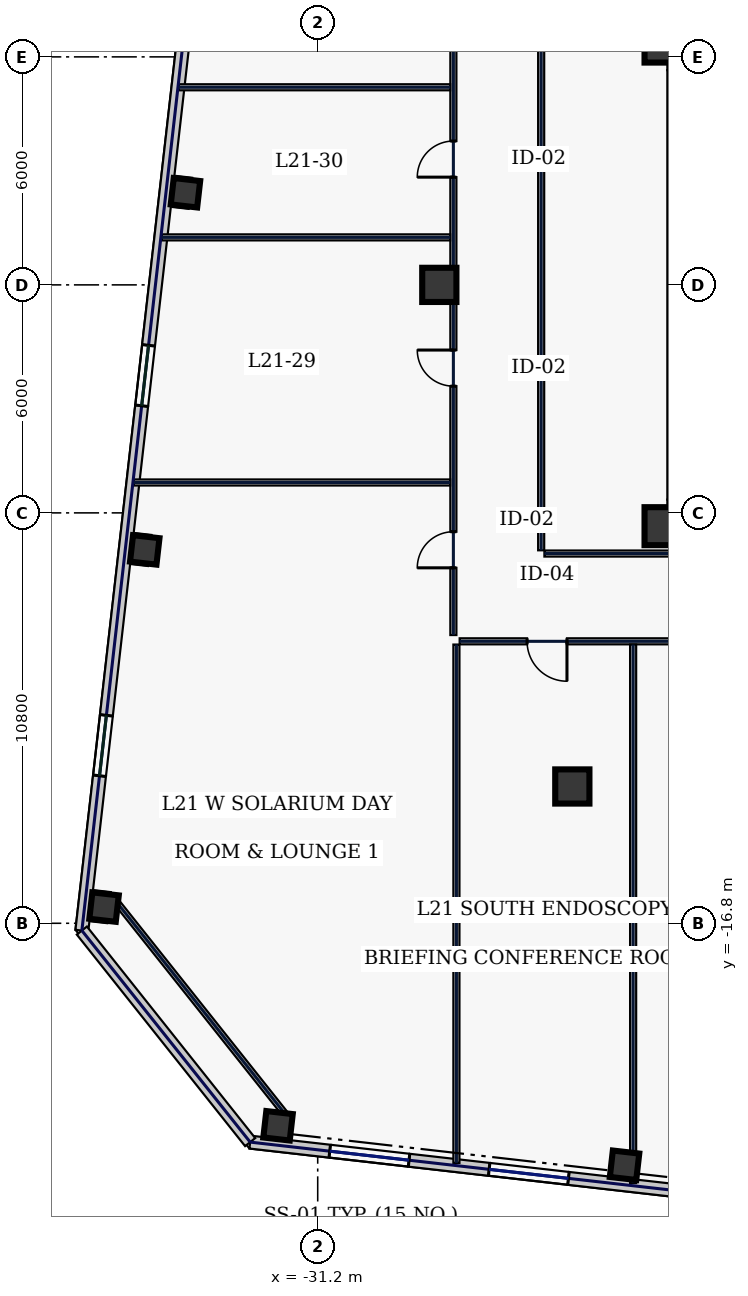
"""IFC4 building model, lengths in metres.
Left out: names, types, materials, properties, quantities, classifications, styles, units other than length and angle.
Written with IfcOpenShell. Run it as: python <this file> out.ifc"""

import sys

from ifc_helpers import new_model, si_unit, direction, frame, frame_2d, origin, origin_2d, place, context, subcontext, project, spatial, rectangle, hollow_rectangle, extrude, element, fill, save


model = new_model("IFC4")
c1 = context("Model", 3, precision=1e-05, world=origin(), true_north=direction((0.0, 1.0)))
c2 = subcontext(c1, "Body", "Model", "MODEL_VIEW")
j1 = project(units=[si_unit("LENGTHUNIT", "METRE"), si_unit("PLANEANGLEUNIT", "RADIAN")], contexts=[c1])
p1 = place(None, origin())
s1 = spatial("IfcSite", under=j1, at=p1, CompositionType="ELEMENT")
p2 = place(p1, origin())
s2 = spatial("IfcBuilding", under=s1, at=p2, CompositionType="ELEMENT")
p3 = place(p2, frame((0.0, 0.0, 97.4)))
s3 = spatial("IfcBuildingStorey", under=s2, at=p3, CompositionType="ELEMENT", Elevation=97.4)
for number, where, z_axis, x_axis in (
    (1, (-22.0, 6.0, 0.0), (0.0, 0.0, 1.0), (1.0, 0.0, 0.0)),
    (2, (-22.0, -6.0, 0.0), (0.0, 0.0, 1.0), (1.0, 0.0, 0.0)),
):
    element("IfcWall", number, at=place(p3, frame(where, z_axis=z_axis, x_axis=x_axis)), inside=s3, PredefinedType="SHEAR", context=c2, shape_type="SweptSolid", body=[
        extrude(rectangle(XDim=11.55, YDim=0.7, at=frame_2d((5.775, 0.0))), origin(), (0.0, 0.0, 1.0), 3.74),
    ])
p4 = place(p3, frame((-21.6, -5.65, 0.0), z_axis=(0.0, 0.0, 1.0), x_axis=(0.0, 1.0, 0.0)))
e3 = element("IfcWall", 3, at=p4, inside=s3, PredefinedType="SHEAR", context=c2, shape_type="SweptSolid", body=[
    extrude(rectangle(XDim=11.3, YDim=0.8, at=frame_2d((5.65, 0.0))), origin(), (0.0, 0.0, 1.0), 3.74),
])
for number, where, z_axis, x_axis in (
    (4, (-22.1, -6.35, 0.0), (0.0, 0.0, 1.0), (1.0, 0.0, 0.0)),
    (5, (-22.1, 6.35, 0.0), (0.0, 0.0, 1.0), (1.0, 0.0, 0.0)),
):
    element("IfcColumn", number, at=place(p3, frame(where, z_axis=z_axis, x_axis=x_axis)), inside=s3, PredefinedType="COLUMN", context=c2, shape_type="SweptSolid", body=[
        extrude(hollow_rectangle(XDim=1.0, YDim=1.0, WallThickness=0.045, at=origin_2d()), origin(), (0.0, 0.0, 1.0), 3.74),
    ])
for number, where, z_axis, x_axis in (
    (6, (-24.5, -13.2, 0.0), (0.0, 0.0, 1.0), (1.0, 0.0, 0.0)),
    (7, (-28.0, 0.0, 0.0), (0.0, 0.0, 1.0), (1.0, 0.0, 0.0)),
):
    element("IfcColumn", number, at=place(p3, frame(where, z_axis=z_axis, x_axis=x_axis)), inside=s3, PredefinedType="COLUMN", context=c2, shape_type="SweptSolid", body=[
        extrude(hollow_rectangle(XDim=0.9, YDim=0.9, WallThickness=0.04, at=origin_2d()), origin(), (0.0, 0.0, 1.0), 3.74),
    ])
for number, where, z_axis, x_axis in (
    (8, (-32.244, -22.129, 0.0), (0.0, 0.0, 1.0), (0.994, -0.113, 0.0)),
    (9, (-23.126, -23.168, 0.0), (0.0, 0.0, 1.0), (0.994, -0.113, 0.0)),
    (10, (-34.68, 2.425, 0.0), (0.0, 0.0, 1.0), (0.994, -0.113, 0.0)),
    (11, (-35.751, -6.974, 0.0), (0.0, 0.0, 1.0), (0.994, -0.113, 0.0)),
    (12, (-36.822, -16.374, 0.0), (0.0, 0.0, 1.0), (0.994, -0.113, 0.0)),
):
    element("IfcColumn", number, at=place(p3, frame(where, z_axis=z_axis, x_axis=x_axis)), inside=s3, PredefinedType="COLUMN", context=c2, shape_type="SweptSolid", body=[
        extrude(hollow_rectangle(XDim=0.7, YDim=0.7, WallThickness=0.032, at=origin_2d()), origin(), (0.0, 0.0, 1.0), 3.74),
    ])
p5 = place(p3, frame((-32.977, -22.559, 0.0), z_axis=(0.0, 0.0, 1.0), x_axis=(0.993570699365, -0.113213362125, 0.0)))
e13 = element("IfcWall", 13, at=p5, inside=s3, PredefinedType="STANDARD", context=c2, shape_type="SweptSolid", body=[
    extrude(rectangle(XDim=17.75, YDim=0.34, at=frame_2d((8.875, 0.0))), origin(), (0.0, 0.0, 1.0), 3.74),
])
p6 = place(p5, frame((2.108, 0.0, 0.67)))
e14 = element("IfcOpeningElement", 14, at=p6, cuts=e13, PredefinedType="OPENING", context=c2, shape_type="SweptSolid", body=[
    extrude(rectangle(XDim=2.1, YDim=2.2, at=frame_2d((1.05, 1.1))), frame((0.0, 0.18, 0.0), z_axis=(0.0, -1.0, 0.0), x_axis=(1.0, 0.0, 0.0)), (0.0, 0.0, 1.0), 0.36),
])
p7 = place(p5, frame((6.329, 0.0, 0.67)))
e15 = element("IfcOpeningElement", 15, at=p7, cuts=e13, PredefinedType="OPENING", context=c2, shape_type="SweptSolid", body=[
    extrude(rectangle(XDim=2.1, YDim=2.2, at=frame_2d((1.05, 1.1))), frame((0.0, 0.18, 0.0), z_axis=(0.0, -1.0, 0.0), x_axis=(1.0, 0.0, 0.0)), (0.0, 0.0, 1.0), 0.36),
])
p8 = place(p5, frame((11.285, 0.0, 0.67)))
e16 = element("IfcOpeningElement", 16, at=p8, cuts=e13, PredefinedType="OPENING", context=c2, shape_type="SweptSolid", body=[
    extrude(rectangle(XDim=2.1, YDim=2.2, at=frame_2d((1.05, 1.1))), frame((0.0, 0.18, 0.0), z_axis=(0.0, -1.0, 0.0), x_axis=(1.0, 0.0, 0.0)), (0.0, 0.0, 1.0), 0.36),
])
p9 = place(p3, frame((-32.968, 21.957, 0.0), z_axis=(0.0, 0.0, 1.0), x_axis=(-0.113201605824, -0.993572038877, 0.0)))
e17 = element("IfcWall", 17, at=p9, inside=s3, PredefinedType="STANDARD", context=c2, shape_type="SweptSolid", body=[
    extrude(rectangle(XDim=39.2, YDim=0.34, at=frame_2d((19.6, 0.0))), origin(), (0.0, 0.0, 1.0), 3.74),
])
p10 = place(p9, frame((4.1, 0.0, 0.58)))
e18 = element("IfcOpeningElement", 18, at=p10, cuts=e17, PredefinedType="OPENING", context=c2, shape_type="SweptSolid", body=[
    extrude(rectangle(XDim=1.6, YDim=2.3, at=frame_2d((0.8, 1.15))), frame((0.0, 0.18, 0.0), z_axis=(0.0, -1.0, 0.0), x_axis=(1.0, 0.0, 0.0)), (0.0, 0.0, 1.0), 0.36),
])
p11 = place(p9, frame((13.9, 0.0, 0.58)))
e19 = element("IfcOpeningElement", 19, at=p11, cuts=e17, PredefinedType="OPENING", context=c2, shape_type="SweptSolid", body=[
    extrude(rectangle(XDim=1.6, YDim=2.3, at=frame_2d((0.8, 1.15))), frame((0.0, 0.18, 0.0), z_axis=(0.0, -1.0, 0.0), x_axis=(1.0, 0.0, 0.0)), (0.0, 0.0, 1.0), 0.36),
])
p12 = place(p9, frame((23.7, 0.0, 0.58)))
e20 = element("IfcOpeningElement", 20, at=p12, cuts=e17, PredefinedType="OPENING", context=c2, shape_type="SweptSolid", body=[
    extrude(rectangle(XDim=1.6, YDim=2.3, at=frame_2d((0.8, 1.15))), frame((0.0, 0.18, 0.0), z_axis=(0.0, -1.0, 0.0), x_axis=(1.0, 0.0, 0.0)), (0.0, 0.0, 1.0), 0.36),
])
p13 = place(p9, frame((33.5, 0.0, 0.58)))
e21 = element("IfcOpeningElement", 21, at=p13, cuts=e17, PredefinedType="OPENING", context=c2, shape_type="SweptSolid", body=[
    extrude(rectangle(XDim=1.6, YDim=2.3, at=frame_2d((0.8, 1.15))), frame((0.0, 0.18, 0.0), z_axis=(0.0, -1.0, 0.0), x_axis=(1.0, 0.0, 0.0)), (0.0, 0.0, 1.0), 0.36),
])
p14 = place(p3, frame((-37.406, -16.991, 0.0), z_axis=(0.0, 0.0, 1.0), x_axis=(0.622507800567, -0.78261359446, 0.0)))
e22 = element("IfcWall", 22, at=p14, inside=s3, PredefinedType="STANDARD", context=c2, shape_type="SweptSolid", body=[
    extrude(rectangle(XDim=7.114, YDim=0.34, at=frame_2d((3.557, 0.0))), origin(), (0.0, 0.0, 1.0), 3.74),
])
p15 = place(p3, frame((-36.556, -16.162, 0.0), z_axis=(0.0, 0.0, 1.0), x_axis=(0.622522641622, -0.782601789334, 0.0)))
e23 = element("IfcWall", 23, at=p15, inside=s3, PredefinedType="PARTITIONING", context=c2, shape_type="SweptSolid", body=[
    extrude(rectangle(XDim=7.354, YDim=0.16, at=frame_2d((3.677, 0.0))), origin(), (0.0, 0.0, 1.0), 3.74),
])
p16 = place(p3, frame((-27.63, -9.215, 0.0), z_axis=(0.0, 0.0, 1.0), x_axis=(0.0, 1.0, 0.0)))
e24 = element("IfcWall", 24, at=p16, inside=s3, PredefinedType="PARTITIONING", context=c2, shape_type="SweptSolid", body=[
    extrude(rectangle(XDim=18.63, YDim=0.16, at=frame_2d((9.315, 0.0))), origin(), (0.0, 0.0, 1.0), 3.74),
])
p17 = place(p16, frame((1.769, 0.0, 0.0)))
e25 = element("IfcOpeningElement", 25, at=p17, cuts=e24, PredefinedType="OPENING", context=c2, shape_type="SweptSolid", body=[
    extrude(rectangle(XDim=0.95, YDim=2.2, at=frame_2d((0.475, 1.1))), frame((0.0, 0.09, 0.0), z_axis=(0.0, -1.0, 0.0), x_axis=(1.0, 0.0, 0.0)), (0.0, 0.0, 1.0), 0.18),
])
p18 = place(p16, frame((6.55, 0.0, 0.0)))
e26 = element("IfcOpeningElement", 26, at=p18, cuts=e24, PredefinedType="OPENING", context=c2, shape_type="SweptSolid", body=[
    extrude(rectangle(XDim=0.95, YDim=2.2, at=frame_2d((0.475, 1.1))), frame((0.0, 0.09, 0.0), z_axis=(0.0, -1.0, 0.0), x_axis=(1.0, 0.0, 0.0)), (0.0, 0.0, 1.0), 0.18),
])
p19 = place(p16, frame((12.05, 0.0, 0.0)))
e27 = element("IfcOpeningElement", 27, at=p19, cuts=e24, PredefinedType="OPENING", context=c2, shape_type="SweptSolid", body=[
    extrude(rectangle(XDim=0.95, YDim=2.2, at=frame_2d((0.475, 1.1))), frame((0.0, 0.09, 0.0), z_axis=(0.0, -1.0, 0.0), x_axis=(1.0, 0.0, 0.0)), (0.0, 0.0, 1.0), 0.18),
])
p20 = place(p16, frame((15.981, 0.0, 0.0)))
e28 = element("IfcOpeningElement", 28, at=p20, cuts=e24, PredefinedType="OPENING", context=c2, shape_type="SweptSolid", body=[
    extrude(rectangle(XDim=0.95, YDim=2.2, at=frame_2d((0.475, 1.1))), frame((0.0, 0.09, 0.0), z_axis=(0.0, -1.0, 0.0), x_axis=(1.0, 0.0, 0.0)), (0.0, 0.0, 1.0), 0.18),
])
p21 = place(p3, frame((27.465, -9.38, 0.0), z_axis=(0.0, 0.0, 1.0), x_axis=(-1.0, 0.0, 0.0)))
e29 = element("IfcWall", 29, at=p21, inside=s3, PredefinedType="PARTITIONING", context=c2, shape_type="SweptSolid", body=[
    extrude(rectangle(XDim=54.93, YDim=0.16, at=frame_2d((27.465, 0.0))), origin(), (0.0, 0.0, 1.0), 3.74),
])
p22 = place(p21, frame((52.106, 0.0, 0.0)))
e30 = element("IfcOpeningElement", 30, at=p22, cuts=e29, PredefinedType="OPENING", context=c2, shape_type="SweptSolid", body=[
    extrude(rectangle(XDim=1.05, YDim=2.2, at=frame_2d((0.525, 1.1))), frame((0.0, 0.09, 0.0), z_axis=(0.0, -1.0, 0.0), x_axis=(1.0, 0.0, 0.0)), (0.0, 0.0, 1.0), 0.18),
])
p23 = place(p21, frame((46.719, 0.0, 0.0)))
e31 = element("IfcOpeningElement", 31, at=p23, cuts=e29, PredefinedType="OPENING", context=c2, shape_type="SweptSolid", body=[
    extrude(rectangle(XDim=0.95, YDim=2.2, at=frame_2d((0.475, 1.1))), frame((0.0, 0.09, 0.0), z_axis=(0.0, -1.0, 0.0), x_axis=(1.0, 0.0, 0.0)), (0.0, 0.0, 1.0), 0.18),
])
p24 = place(p21, frame((39.46, 0.0, 0.0)))
e32 = element("IfcOpeningElement", 32, at=p24, cuts=e29, PredefinedType="OPENING", context=c2, shape_type="SweptSolid", body=[
    extrude(rectangle(XDim=1.15, YDim=2.2, at=frame_2d((0.575, 1.1))), frame((0.0, 0.09, 0.0), z_axis=(0.0, -1.0, 0.0), x_axis=(1.0, 0.0, 0.0)), (0.0, 0.0, 1.0), 0.18),
])
p25 = place(p21, frame((29.747, 0.0, 0.0)))
e33 = element("IfcOpeningElement", 33, at=p25, cuts=e29, PredefinedType="OPENING", context=c2, shape_type="SweptSolid", body=[
    extrude(rectangle(XDim=0.95, YDim=2.2, at=frame_2d((0.475, 1.1))), frame((0.0, 0.09, 0.0), z_axis=(0.0, -1.0, 0.0), x_axis=(1.0, 0.0, 0.0)), (0.0, 0.0, 1.0), 0.18),
])
p26 = place(p21, frame((21.87, 0.0, 0.0)))
e34 = element("IfcOpeningElement", 34, at=p26, cuts=e29, PredefinedType="OPENING", context=c2, shape_type="SweptSolid", body=[
    extrude(rectangle(XDim=0.95, YDim=2.2, at=frame_2d((0.475, 1.1))), frame((0.0, 0.09, 0.0), z_axis=(0.0, -1.0, 0.0), x_axis=(1.0, 0.0, 0.0)), (0.0, 0.0, 1.0), 0.18),
])
p27 = place(p21, frame((15.11, 0.0, 0.0)))
e35 = element("IfcOpeningElement", 35, at=p27, cuts=e29, PredefinedType="OPENING", context=c2, shape_type="SweptSolid", body=[
    extrude(rectangle(XDim=1.05, YDim=2.2, at=frame_2d((0.525, 1.1))), frame((0.0, 0.09, 0.0), z_axis=(0.0, -1.0, 0.0), x_axis=(1.0, 0.0, 0.0)), (0.0, 0.0, 1.0), 0.18),
])
p28 = place(p21, frame((8.065, 0.0, 0.0)))
e36 = element("IfcOpeningElement", 36, at=p28, cuts=e29, PredefinedType="OPENING", context=c2, shape_type="SweptSolid", body=[
    extrude(rectangle(XDim=0.95, YDim=2.2, at=frame_2d((0.475, 1.1))), frame((0.0, 0.09, 0.0), z_axis=(0.0, -1.0, 0.0), x_axis=(1.0, 0.0, 0.0)), (0.0, 0.0, 1.0), 0.18),
])
p29 = place(p21, frame((2.044, 0.0, 0.0)))
e37 = element("IfcOpeningElement", 37, at=p29, cuts=e29, PredefinedType="OPENING", context=c2, shape_type="SweptSolid", body=[
    extrude(rectangle(XDim=0.95, YDim=2.2, at=frame_2d((0.475, 1.1))), frame((0.0, 0.09, 0.0), z_axis=(0.0, -1.0, 0.0), x_axis=(1.0, 0.0, 0.0)), (0.0, 0.0, 1.0), 0.18),
])
p30 = place(p3, frame((-25.32, 7.185, 0.0), z_axis=(0.0, 0.0, 1.0), x_axis=(0.0, -1.0, 0.0)))
e38 = element("IfcWall", 38, at=p30, inside=s3, PredefinedType="PARTITIONING", context=c2, shape_type="SweptSolid", body=[
    extrude(rectangle(XDim=14.17, YDim=0.16, at=frame_2d((7.085, 0.0))), origin(), (0.0, 0.0, 1.0), 3.74),
])
p31 = place(p3, frame((-25.235, -7.07, 0.0), z_axis=(0.0, 0.0, 1.0), x_axis=(1.0, 0.0, 0.0)))
e39 = element("IfcWall", 39, at=p31, inside=s3, PredefinedType="PARTITIONING", context=c2, shape_type="SweptSolid", body=[
    extrude(rectangle(XDim=14.57, YDim=0.16, at=frame_2d((7.285, 0.0))), origin(), (0.0, 0.0, 1.0), 3.74),
])
p32 = place(p3, frame((-27.55, -23.106, 0.0), z_axis=(0.0, 0.0, 1.0), x_axis=(0.0, 1.0, 0.0)))
e40 = element("IfcWall", 40, at=p32, inside=s3, PredefinedType="PARTITIONING", context=c2, shape_type="SweptSolid", body=[
    extrude(rectangle(XDim=13.641, YDim=0.16, at=frame_2d((6.821, 0.0))), origin(), (0.0, 0.0, 1.0), 3.74),
])
p33 = place(p3, frame((-22.9, -23.636, 0.0), z_axis=(0.0, 0.0, 1.0), x_axis=(0.0, 1.0, 0.0)))
e41 = element("IfcWall", 41, at=p33, inside=s3, PredefinedType="PARTITIONING", context=c2, shape_type="SweptSolid", body=[
    extrude(rectangle(XDim=14.171, YDim=0.16, at=frame_2d((7.085, 0.0))), origin(), (0.0, 0.0, 1.0), 3.74),
])
p34 = place(p3, frame((-36.042, -5.2, 0.0), z_axis=(0.0, 0.0, 1.0), x_axis=(1.0, 0.0, 0.0)))
e42 = element("IfcWall", 42, at=p34, inside=s3, PredefinedType="PARTITIONING", context=c2, shape_type="SweptSolid", body=[
    extrude(rectangle(XDim=8.327, YDim=0.16, at=frame_2d((4.164, 0.0))), origin(), (0.0, 0.0, 1.0), 3.74),
])
p35 = place(p3, frame((-35.307, 1.25, 0.0), z_axis=(0.0, 0.0, 1.0), x_axis=(1.0, 0.0, 0.0)))
e43 = element("IfcWall", 43, at=p35, inside=s3, PredefinedType="PARTITIONING", context=c2, shape_type="SweptSolid", body=[
    extrude(rectangle(XDim=7.592, YDim=0.16, at=frame_2d((3.796, 0.0))), origin(), (0.0, 0.0, 1.0), 3.74),
])
p36 = place(p3, frame((-34.857, 5.2, 0.0), z_axis=(0.0, 0.0, 1.0), x_axis=(1.0, 0.0, 0.0)))
e44 = element("IfcWall", 44, at=p36, inside=s3, PredefinedType="PARTITIONING", context=c2, shape_type="SweptSolid", body=[
    extrude(rectangle(XDim=7.142, YDim=0.16, at=frame_2d((3.571, 0.0))), origin(), (0.0, 0.0, 1.0), 3.74),
])
p37 = place(p6, origin())
e45 = element("IfcWindow", 45, at=p37, inside=s3, PartitioningType="SINGLE_PANEL", PredefinedType="WINDOW", context=c2, shape_type="SweptSolid", body=[
    extrude(rectangle(XDim=2.1, YDim=2.2, at=frame_2d((1.05, 1.1))), frame((0.0, 0.03, 0.0), z_axis=(0.0, -1.0, 0.0), x_axis=(1.0, 0.0, 0.0)), (0.0, 0.0, 1.0), 0.06),
])
fill(e14, e45)
p38 = place(p7, origin())
e46 = element("IfcWindow", 46, at=p38, inside=s3, PartitioningType="SINGLE_PANEL", PredefinedType="WINDOW", context=c2, shape_type="SweptSolid", body=[
    extrude(rectangle(XDim=2.1, YDim=2.2, at=frame_2d((1.05, 1.1))), frame((0.0, 0.03, 0.0), z_axis=(0.0, -1.0, 0.0), x_axis=(1.0, 0.0, 0.0)), (0.0, 0.0, 1.0), 0.06),
])
fill(e15, e46)
p39 = place(p12, origin())
e47 = element("IfcWindow", 47, at=p39, inside=s3, PartitioningType="SINGLE_PANEL", PredefinedType="WINDOW", context=c2, shape_type="SweptSolid", body=[
    extrude(rectangle(XDim=1.6, YDim=2.3, at=frame_2d((0.8, 1.15))), frame((0.0, 0.03, 0.0), z_axis=(0.0, -1.0, 0.0), x_axis=(1.0, 0.0, 0.0)), (0.0, 0.0, 1.0), 0.06),
])
fill(e20, e47)
p40 = place(p13, origin())
e48 = element("IfcWindow", 48, at=p40, inside=s3, PartitioningType="SINGLE_PANEL", PredefinedType="WINDOW", context=c2, shape_type="SweptSolid", body=[
    extrude(rectangle(XDim=1.6, YDim=2.3, at=frame_2d((0.8, 1.15))), frame((0.0, 0.03, 0.0), z_axis=(0.0, -1.0, 0.0), x_axis=(1.0, 0.0, 0.0)), (0.0, 0.0, 1.0), 0.06),
])
fill(e21, e48)
p41 = place(p22, origin())
e49 = element("IfcDoor", 49, at=p41, inside=s3, OperationType="SINGLE_SWING_LEFT", PredefinedType="DOOR", context=c2, shape_type="SweptSolid", body=[
    extrude(rectangle(XDim=1.05, YDim=2.2, at=frame_2d((0.525, 1.1))), frame((0.0, 0.025, 0.0), z_axis=(0.0, -1.0, 0.0), x_axis=(1.0, 0.0, 0.0)), (0.0, 0.0, 1.0), 0.05),
])
fill(e30, e49)
p42 = place(p17, origin())
e50 = element("IfcDoor", 50, at=p42, inside=s3, OperationType="SINGLE_SWING_LEFT", PredefinedType="DOOR", context=c2, shape_type="SweptSolid", body=[
    extrude(rectangle(XDim=0.95, YDim=2.2, at=frame_2d((0.475, 1.1))), frame((0.0, 0.025, 0.0), z_axis=(0.0, -1.0, 0.0), x_axis=(1.0, 0.0, 0.0)), (0.0, 0.0, 1.0), 0.05),
])
fill(e25, e50)
p43 = place(p18, origin())
e51 = element("IfcDoor", 51, at=p43, inside=s3, OperationType="SINGLE_SWING_RIGHT", PredefinedType="DOOR", context=c2, shape_type="SweptSolid", body=[
    extrude(rectangle(XDim=0.95, YDim=2.2, at=frame_2d((0.475, 1.1))), frame((0.0, 0.025, 0.0), z_axis=(0.0, -1.0, 0.0), x_axis=(1.0, 0.0, 0.0)), (0.0, 0.0, 1.0), 0.05),
])
fill(e26, e51)
p44 = place(p19, origin())
e52 = element("IfcDoor", 52, at=p44, inside=s3, OperationType="SINGLE_SWING_LEFT", PredefinedType="DOOR", context=c2, shape_type="SweptSolid", body=[
    extrude(rectangle(XDim=0.95, YDim=2.2, at=frame_2d((0.475, 1.1))), frame((0.0, 0.025, 0.0), z_axis=(0.0, -1.0, 0.0), x_axis=(1.0, 0.0, 0.0)), (0.0, 0.0, 1.0), 0.05),
])
fill(e27, e52)
save(model, sys.argv[1])
